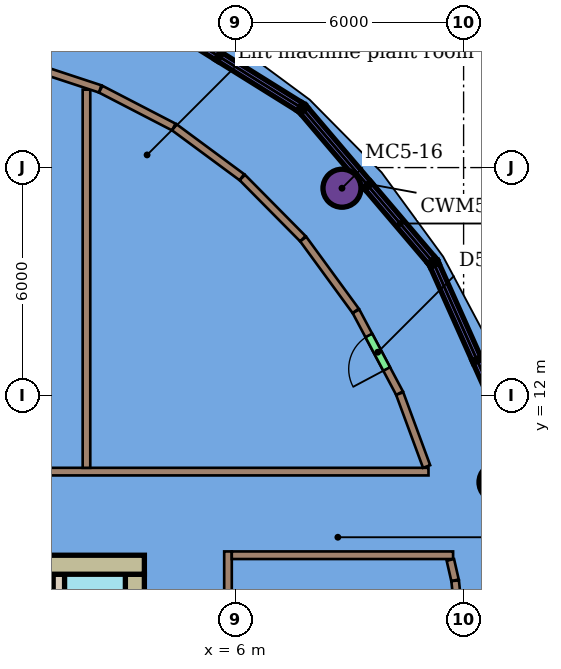
"""IFC4 building model, lengths in metres.
Left out: names, types, materials, properties, quantities, classifications, styles, units other than length and angle.
Written with IfcOpenShell. Run it as: python <this file> out.ifc"""

import sys

from ifc_helpers import new_model, si_unit, direction, frame, frame_2d, origin, origin_2d, place, context, subcontext, project, spatial, rectangle, hollow_circle, extrude, element, fill, save


model = new_model("IFC4")
c1 = context("Model", 3, precision=1e-05, world=origin(), true_north=direction((0.0, 1.0)))
c2 = subcontext(c1, "Body", "Model", "MODEL_VIEW")
j1 = project(units=[si_unit("LENGTHUNIT", "METRE"), si_unit("PLANEANGLEUNIT", "RADIAN")], contexts=[c1])
p1 = place(None, origin())
s1 = spatial("IfcSite", under=j1, at=p1, CompositionType="ELEMENT")
p2 = place(p1, origin())
s2 = spatial("IfcBuilding", under=s1, at=p2, CompositionType="ELEMENT")
p3 = place(p2, frame((0.0, 0.0, 317.1)))
s3 = spatial("IfcBuildingStorey", under=s2, at=p3, CompositionType="ELEMENT", Elevation=317.1)
for number, where, z_axis, x_axis in (
    (1, (12.906, 9.72, 0.0), (0.0, 0.0, 1.0), (1.0, 0.0, 0.0)),
    (2, (8.8, 17.457, 0.0), (0.0, 0.0, 1.0), (1.0, 0.0, 0.0)),
):
    element("IfcColumn", number, at=place(p3, frame(where, z_axis=z_axis, x_axis=x_axis)), inside=s3, PredefinedType="COLUMN", context=c2, shape_type="SweptSolid", body=[
        extrude(hollow_circle(Radius=0.5, WallThickness=0.04, at=origin_2d()), origin(), (0.0, 0.0, 1.0), 4.0),
    ])
p4 = place(p3, frame((-17.9, 10.0, 0.0), z_axis=(0.0, 0.0, 1.0), x_axis=(1.0, 0.0, 0.0)))
e3 = element("IfcWall", 3, at=p4, inside=s3, PredefinedType="PARTITIONING", context=c2, shape_type="SweptSolid", body=[
    extrude(rectangle(XDim=28.976, YDim=0.2, at=frame_2d((14.488, 0.0))), origin(), (0.0, 0.0, 1.0), 3.65),
])
p5 = place(p3, frame((5.8, -9.9, 0.0), z_axis=(0.0, 0.0, 1.0), x_axis=(0.0, 1.0, 0.0)))
e4 = element("IfcWall", 4, at=p5, inside=s3, PredefinedType="PARTITIONING", context=c2, shape_type="SweptSolid", body=[
    extrude(rectangle(XDim=17.8, YDim=0.2, at=frame_2d((8.9, 0.0))), origin(), (0.0, 0.0, 1.0), 3.65),
])
p6 = place(p3, frame((5.9, 7.8, 0.0), z_axis=(0.0, 0.0, 1.0), x_axis=(1.0, 0.0, 0.0)))
e5 = element("IfcWall", 5, at=p6, inside=s3, PredefinedType="PARTITIONING", context=c2, shape_type="SweptSolid", body=[
    extrude(rectangle(XDim=5.824, YDim=0.2, at=frame_2d((2.912, 0.0))), origin(), (0.0, 0.0, 1.0), 3.65),
])
p7 = place(p3, frame((2.076, 10.1, 0.0), z_axis=(0.0, 0.0, 1.0), x_axis=(0.0, 1.0, 0.0)))
e6 = element("IfcWall", 6, at=p7, inside=s3, PredefinedType="PARTITIONING", context=c2, shape_type="SweptSolid", body=[
    extrude(rectangle(XDim=9.951, YDim=0.2, at=frame_2d((4.975, 0.0))), origin(), (0.0, 0.0, 1.0), 3.65),
])
p8 = place(p3, frame((7.78, 16.119, 0.0), z_axis=(0.0, 0.0, 1.0), x_axis=(0.590082027637, -0.807343297897, 0.0)))
e7 = element("IfcWall", 7, at=p8, inside=s3, PredefinedType="PARTITIONING", context=c2, shape_type="SweptSolid", body=[
    extrude(rectangle(XDim=2.338, YDim=0.2, at=frame_2d((1.169, 0.0))), origin(), (0.0, 0.0, 1.0), 3.65),
])
p9 = place(p3, frame((10.314, 12.065, 0.0), z_axis=(0.0, 0.0, 1.0), x_axis=(-0.469606334902, 0.882875920059, 0.0)))
e8 = element("IfcWall", 8, at=p9, inside=s3, PredefinedType="PARTITIONING", context=c2, shape_type="SweptSolid", body=[
    extrude(rectangle(XDim=2.44, YDim=0.2, at=frame_2d((1.22, 0.0))), origin(), (0.0, 0.0, 1.0), 3.65),
])
p10 = place(p9, frame((0.72, 0.0, 0.0)))
e9 = element("IfcOpeningElement", 9, at=p10, cuts=e8, PredefinedType="OPENING", context=c2, shape_type="SweptSolid", body=[
    extrude(rectangle(XDim=1.0, YDim=2.1, at=frame_2d((0.5, 1.05))), frame((0.0, 0.11, 0.0), z_axis=(0.0, -1.0, 0.0), x_axis=(1.0, 0.0, 0.0)), (0.0, 0.0, 1.0), 0.22),
])
p11 = place(p3, frame((10.319, 12.052, 0.0), z_axis=(0.0, 0.0, 1.0), x_axis=(0.346197844841, -0.938161527791, 0.0)))
e10 = element("IfcWall", 10, at=p11, inside=s3, PredefinedType="PARTITIONING", context=c2, shape_type="SweptSolid", body=[
    extrude(rectangle(XDim=2.044, YDim=0.2, at=frame_2d((1.022, 0.0))), origin(), (0.0, 0.0, 1.0), 3.65),
])
p12 = place(p3, frame((0.365, 20.752, 0.0), z_axis=(0.0, 0.0, 1.0), x_axis=(0.949852302688, -0.312698901627, 0.0)))
e11 = element("IfcWall", 11, at=p12, inside=s3, PredefinedType="PARTITIONING", context=c2, shape_type="SweptSolid", body=[
    extrude(rectangle(XDim=2.181, YDim=0.2, at=frame_2d((1.09, 0.0))), origin(), (0.0, 0.0, 1.0), 3.65),
])
p13 = place(p3, frame((2.451, 20.063, 0.0), z_axis=(0.0, 0.0, 1.0), x_axis=(0.888068415533, -0.45971131086, 0.0)))
e12 = element("IfcWall", 12, at=p13, inside=s3, PredefinedType="PARTITIONING", context=c2, shape_type="SweptSolid", body=[
    extrude(rectangle(XDim=2.165, YDim=0.2, at=frame_2d((1.082, 0.0))), origin(), (0.0, 0.0, 1.0), 3.65),
])
p14 = place(p3, frame((4.387, 19.06, 0.0), z_axis=(0.0, 0.0, 1.0), x_axis=(0.80443326696, -0.594043027909, 0.0)))
e13 = element("IfcWall", 13, at=p14, inside=s3, PredefinedType="PARTITIONING", context=c2, shape_type="SweptSolid", body=[
    extrude(rectangle(XDim=2.209, YDim=0.2, at=frame_2d((1.105, 0.0))), origin(), (0.0, 0.0, 1.0), 3.65),
])
p15 = place(p3, frame((6.177, 17.739, 0.0), z_axis=(0.0, 0.0, 1.0), x_axis=(0.703376280453, -0.710817703843, 0.0)))
e14 = element("IfcWall", 14, at=p15, inside=s3, PredefinedType="PARTITIONING", context=c2, shape_type="SweptSolid", body=[
    extrude(rectangle(XDim=2.264, YDim=0.2, at=frame_2d((1.132, 0.0))), origin(), (0.0, 0.0, 1.0), 3.65),
])
p16 = place(p3, frame((11.652, 7.678, 0.0), z_axis=(0.0, 0.0, 1.0), x_axis=(0.2234024776, -0.974726286196, 0.0)))
e15 = element("IfcWall", 15, at=p16, inside=s3, PredefinedType="PARTITIONING", context=c2, shape_type="SweptSolid", body=[
    extrude(rectangle(XDim=0.551, YDim=0.2, at=frame_2d((0.275, 0.0))), origin(), (0.0, 0.0, 1.0), 3.65),
])
p17 = place(p3, frame((12.055, 4.443, 0.0), z_axis=(0.0, 0.0, 1.0), x_axis=(-0.102877560919, 0.994694027055, 0.0)))
e16 = element("IfcWall", 16, at=p17, inside=s3, PredefinedType="PARTITIONING", context=c2, shape_type="SweptSolid", body=[
    extrude(rectangle(XDim=2.701, YDim=0.2, at=frame_2d((1.35, 0.0))), origin(), (0.0, 0.0, 1.0), 3.65),
])
p18 = place(p17, frame((0.45, 0.0, 0.0)))
e17 = element("IfcOpeningElement", 17, at=p18, cuts=e16, PredefinedType="OPENING", context=c2, shape_type="SweptSolid", body=[
    extrude(rectangle(XDim=1.8, YDim=2.4, at=frame_2d((0.9, 1.2))), frame((0.0, 0.11, 0.0), z_axis=(0.0, -1.0, 0.0), x_axis=(1.0, 0.0, 0.0)), (0.0, 0.0, 1.0), 0.22),
])
p19 = place(p3, frame((3.6, 7.55, 0.0), z_axis=(0.0, 0.0, 1.0), x_axis=(-1.0, 0.0, 0.0)))
e18 = element("IfcWall", 18, at=p19, inside=s3, PredefinedType="SHEAR", context=c2, shape_type="SweptSolid", body=[
    extrude(rectangle(XDim=9.6, YDim=0.5, at=frame_2d((4.8, 0.0))), origin(), (0.0, 0.0, 1.0), 3.9),
])
p20 = place(p19, frame((3.2, 0.0, 0.0)))
e19 = element("IfcOpeningElement", 19, at=p20, cuts=e18, PredefinedType="OPENING", context=c2, shape_type="SweptSolid", body=[
    extrude(rectangle(XDim=1.2, YDim=2.1, at=frame_2d((0.6, 1.05))), frame((0.0, 0.26, 0.0), z_axis=(0.0, -1.0, 0.0), x_axis=(1.0, 0.0, 0.0)), (0.0, 0.0, 1.0), 0.52),
])
p21 = place(p3, frame((3.35, -7.3, 0.0), z_axis=(0.0, 0.0, 1.0), x_axis=(0.0, 1.0, 0.0)))
e20 = element("IfcWall", 20, at=p21, inside=s3, PredefinedType="SHEAR", context=c2, shape_type="SweptSolid", body=[
    extrude(rectangle(XDim=14.6, YDim=0.5, at=frame_2d((7.3, 0.0))), origin(), (0.0, 0.0, 1.0), 3.9),
])
p22 = place(p21, frame((2.8, 0.0, 0.0)))
e21 = element("IfcOpeningElement", 21, at=p22, cuts=e20, PredefinedType="OPENING", context=c2, shape_type="SweptSolid", body=[
    extrude(rectangle(XDim=1.2, YDim=2.1, at=frame_2d((0.6, 1.05))), frame((0.0, 0.26, 0.0), z_axis=(0.0, -1.0, 0.0), x_axis=(1.0, 0.0, 0.0)), (0.0, 0.0, 1.0), 0.52),
])
p23 = place(p21, frame((10.6, 0.0, 0.0)))
e22 = element("IfcOpeningElement", 22, at=p23, cuts=e20, PredefinedType="OPENING", context=c2, shape_type="SweptSolid", body=[
    extrude(rectangle(XDim=1.2, YDim=2.1, at=frame_2d((0.6, 1.05))), frame((0.0, 0.26, 0.0), z_axis=(0.0, -1.0, 0.0), x_axis=(1.0, 0.0, 0.0)), (0.0, 0.0, 1.0), 0.52),
])
p24 = place(p3, frame((1.35, -7.3, 0.0), z_axis=(0.0, 0.0, 1.0), x_axis=(0.0, 1.0, 0.0)))
e23 = element("IfcWall", 23, at=p24, inside=s3, PredefinedType="SHEAR", context=c2, shape_type="SweptSolid", body=[
    extrude(rectangle(XDim=14.6, YDim=0.3, at=frame_2d((7.3, 0.0))), origin(), (0.0, 0.0, 1.0), 3.9),
])
p25 = place(p24, frame((1.21, 0.0, 0.0)))
e24 = element("IfcOpeningElement", 24, at=p25, cuts=e23, PredefinedType="OPENING", context=c2, shape_type="SweptSolid", body=[
    extrude(rectangle(XDim=1.0, YDim=2.1, at=frame_2d((0.5, 1.05))), frame((0.0, 0.16, 0.0), z_axis=(0.0, -1.0, 0.0), x_axis=(1.0, 0.0, 0.0)), (0.0, 0.0, 1.0), 0.32),
])
p26 = place(p24, frame((6.55, 0.0, 0.0)))
e25 = element("IfcOpeningElement", 25, at=p26, cuts=e23, PredefinedType="OPENING", context=c2, shape_type="SweptSolid", body=[
    extrude(rectangle(XDim=1.5, YDim=2.1, at=frame_2d((0.75, 1.05))), frame((0.0, 0.16, 0.0), z_axis=(0.0, -1.0, 0.0), x_axis=(1.0, 0.0, 0.0)), (0.0, 0.0, 1.0), 0.32),
])
p27 = place(p10, origin())
e26 = element("IfcDoor", 26, at=p27, inside=s3, OperationType="SINGLE_SWING_LEFT", PredefinedType="DOOR", context=c2, shape_type="SweptSolid", body=[
    extrude(rectangle(XDim=1.0, YDim=2.1, at=frame_2d((0.5, 1.05))), frame((0.0, 0.025, 0.0), z_axis=(0.0, -1.0, 0.0), x_axis=(1.0, 0.0, 0.0)), (0.0, 0.0, 1.0), 0.05),
])
fill(e9, e26)
save(model, sys.argv[1])
